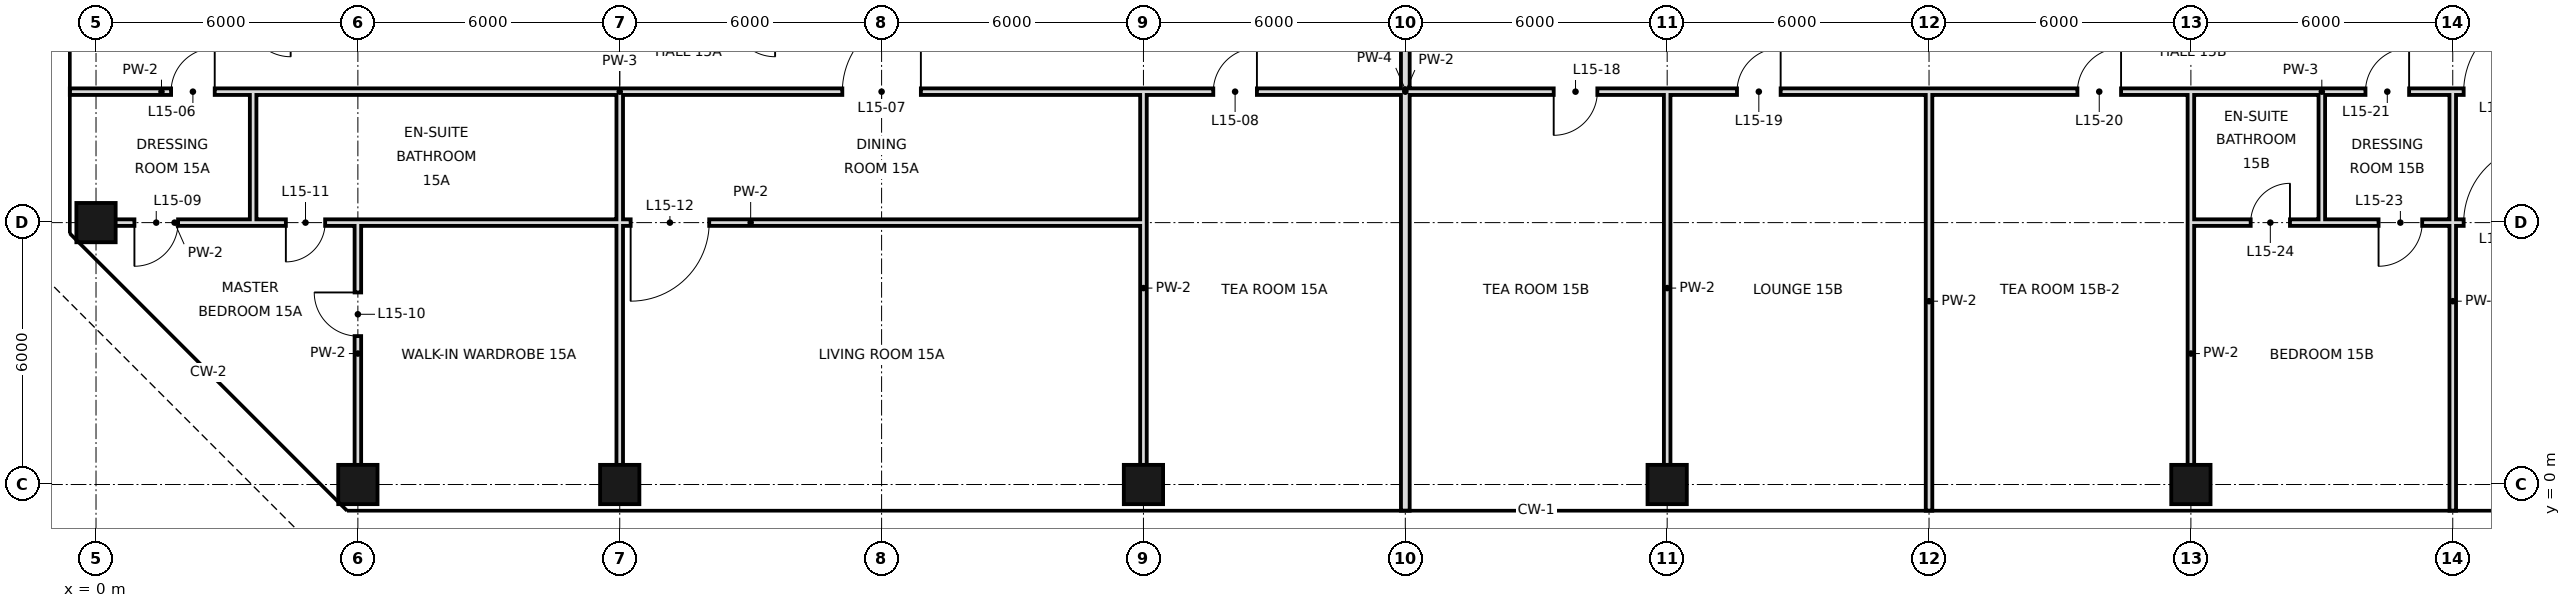
"""IFC4 building model, lengths in metres.
Left out: names, types, materials, properties, quantities, classifications, styles, units other than length and angle.
Written with IfcOpenShell. Run it as: python <this file> out.ifc"""

import sys

from ifc_helpers import new_model, si_unit, direction, frame, frame_2d, origin, origin_2d, place, context, subcontext, project, spatial, rectangle, hollow_rectangle, extrude, element, fill, save


model = new_model("IFC4")
c1 = context("Model", 3, precision=1e-05, world=origin(), true_north=direction((0.0, 1.0)))
c2 = subcontext(c1, "Body", "Model", "MODEL_VIEW")
j1 = project(units=[si_unit("LENGTHUNIT", "METRE"), si_unit("PLANEANGLEUNIT", "RADIAN")], contexts=[c1])
p1 = place(None, origin())
s1 = spatial("IfcSite", under=j1, at=p1, CompositionType="ELEMENT")
p2 = place(p1, origin())
s2 = spatial("IfcBuilding", under=s1, at=p2, CompositionType="ELEMENT")
p3 = place(p2, frame((0.0, 0.0, 75.0)))
s3 = spatial("IfcBuildingStorey", under=s2, at=p3, CompositionType="ELEMENT", Elevation=75.0)
for number, where, z_axis, x_axis in (
    (1, (0.0, 6.0, 0.0), (0.0, 0.0, 1.0), (1.0, 0.0, 0.0)),
    (2, (6.0, 0.0, 0.0), (0.0, 0.0, 1.0), (1.0, 0.0, 0.0)),
    (3, (12.0, 0.0, 0.0), (0.0, 0.0, 1.0), (1.0, 0.0, 0.0)),
    (4, (24.0, 0.0, 0.0), (0.0, 0.0, 1.0), (1.0, 0.0, 0.0)),
    (5, (36.0, 0.0, 0.0), (0.0, 0.0, 1.0), (1.0, 0.0, 0.0)),
    (6, (48.0, 0.0, 0.0), (0.0, 0.0, 1.0), (1.0, 0.0, 0.0)),
):
    element("IfcColumn", number, at=place(p3, frame(where, z_axis=z_axis, x_axis=x_axis)), inside=s3, PredefinedType="COLUMN", context=c2, shape_type="SweptSolid", body=[
        extrude(hollow_rectangle(XDim=0.9, YDim=0.9, WallThickness=0.045, at=origin_2d()), origin(), (0.0, 0.0, 1.0), 3.6),
    ])
p4 = place(p3, frame((12.0, 0.0, 0.0), z_axis=(0.0, 0.0, 1.0), x_axis=(0.0, 1.0, 0.0)))
e7 = element("IfcWall", 7, at=p4, inside=s3, PredefinedType="PARTITIONING", context=c2, shape_type="SweptSolid", body=[
    extrude(rectangle(XDim=6.0, YDim=0.15, at=frame_2d((3.0, 0.0))), origin(), (0.0, 0.0, 1.0), 2.72),
])
p5 = place(p3, frame((12.0, 6.0, 0.0), z_axis=(0.0, 0.0, 1.0), x_axis=(0.0, 1.0, 0.0)))
e8 = element("IfcWall", 8, at=p5, inside=s3, PredefinedType="PARTITIONING", context=c2, shape_type="SweptSolid", body=[
    extrude(rectangle(XDim=3.0, YDim=0.15, at=frame_2d((1.5, 0.0))), origin(), (0.0, 0.0, 1.0), 2.72),
])
p6 = place(p3, frame((24.0, 0.0, 0.0), z_axis=(0.0, 0.0, 1.0), x_axis=(0.0, 1.0, 0.0)))
e9 = element("IfcWall", 9, at=p6, inside=s3, PredefinedType="PARTITIONING", context=c2, shape_type="SweptSolid", body=[
    extrude(rectangle(XDim=9.0, YDim=0.15, at=frame_2d((4.5, 0.0))), origin(), (0.0, 0.0, 1.0), 2.72),
])
p7 = place(p3, frame((3.6, 6.0, 0.0), z_axis=(0.0, 0.0, 1.0), x_axis=(0.0, 1.0, 0.0)))
e10 = element("IfcWall", 10, at=p7, inside=s3, PredefinedType="PARTITIONING", context=c2, shape_type="SweptSolid", body=[
    extrude(rectangle(XDim=3.0, YDim=0.15, at=frame_2d((1.5, 0.0))), origin(), (0.0, 0.0, 1.0), 3.42),
])
p8 = place(p3, frame((30.0, -0.6, 0.0), z_axis=(0.0, 0.0, 1.0), x_axis=(0.0, 1.0, 0.0)))
e11 = element("IfcWall", 11, at=p8, inside=s3, PredefinedType="SOLIDWALL", context=c2, shape_type="SweptSolid", body=[
    extrude(rectangle(XDim=19.3, YDim=0.2, at=frame_2d((9.65, 0.0))), origin(), (0.0, 0.0, 1.0), 2.72),
])
p9 = place(p3, frame((36.0, 0.0, 0.0), z_axis=(0.0, 0.0, 1.0), x_axis=(0.0, 1.0, 0.0)))
e12 = element("IfcWall", 12, at=p9, inside=s3, PredefinedType="PARTITIONING", context=c2, shape_type="SweptSolid", body=[
    extrude(rectangle(XDim=9.0, YDim=0.15, at=frame_2d((4.5, 0.0))), origin(), (0.0, 0.0, 1.0), 2.72),
])
p10 = place(p3, frame((42.0, -0.6, 0.0), z_axis=(0.0, 0.0, 1.0), x_axis=(0.0, 1.0, 0.0)))
e13 = element("IfcWall", 13, at=p10, inside=s3, PredefinedType="PARTITIONING", context=c2, shape_type="SweptSolid", body=[
    extrude(rectangle(XDim=9.6, YDim=0.15, at=frame_2d((4.8, 0.0))), origin(), (0.0, 0.0, 1.0), 2.72),
])
p11 = place(p3, frame((48.0, 0.0, 0.0), z_axis=(0.0, 0.0, 1.0), x_axis=(0.0, 1.0, 0.0)))
e14 = element("IfcWall", 14, at=p11, inside=s3, PredefinedType="PARTITIONING", context=c2, shape_type="SweptSolid", body=[
    extrude(rectangle(XDim=6.0, YDim=0.15, at=frame_2d((3.0, 0.0))), origin(), (0.0, 0.0, 1.0), 2.72),
])
p12 = place(p3, frame((48.0, 6.0, 0.0), z_axis=(0.0, 0.0, 1.0), x_axis=(0.0, 1.0, 0.0)))
e15 = element("IfcWall", 15, at=p12, inside=s3, PredefinedType="PARTITIONING", context=c2, shape_type="SweptSolid", body=[
    extrude(rectangle(XDim=3.0, YDim=0.15, at=frame_2d((1.5, 0.0))), origin(), (0.0, 0.0, 1.0), 2.72),
])
p13 = place(p3, frame((51.0, 6.0, 0.0), z_axis=(0.0, 0.0, 1.0), x_axis=(0.0, 1.0, 0.0)))
e16 = element("IfcWall", 16, at=p13, inside=s3, PredefinedType="PARTITIONING", context=c2, shape_type="SweptSolid", body=[
    extrude(rectangle(XDim=3.0, YDim=0.15, at=frame_2d((1.5, 0.0))), origin(), (0.0, 0.0, 1.0), 3.42),
])
p14 = place(p3, frame((54.0, -0.6, 0.0), z_axis=(0.0, 0.0, 1.0), x_axis=(0.0, 1.0, 0.0)))
e17 = element("IfcWall", 17, at=p14, inside=s3, PredefinedType="PARTITIONING", context=c2, shape_type="SweptSolid", body=[
    extrude(rectangle(XDim=9.6, YDim=0.15, at=frame_2d((4.8, 0.0))), origin(), (0.0, 0.0, 1.0), 3.42),
])
p15 = place(p3, frame((6.0, 0.0, 0.0), z_axis=(0.0, 0.0, 1.0), x_axis=(0.0, 1.0, 0.0)))
e18 = element("IfcWall", 18, at=p15, inside=s3, PredefinedType="PARTITIONING", context=c2, shape_type="SweptSolid", body=[
    extrude(rectangle(XDim=6.0, YDim=0.15, at=frame_2d((3.0, 0.0))), origin(), (0.0, 0.0, 1.0), 2.72),
])
p16 = place(p15, frame((3.4, 0.0, 0.0)))
e19 = element("IfcOpeningElement", 19, at=p16, cuts=e18, PredefinedType="OPENING", context=c2, shape_type="SweptSolid", body=[
    extrude(rectangle(XDim=1.0, YDim=2.4, at=frame_2d((0.5, 1.2))), frame((0.0, 0.085, 0.0), z_axis=(0.0, -1.0, 0.0), x_axis=(1.0, 0.0, 0.0)), (0.0, 0.0, 1.0), 0.17),
])
p17 = place(p3, frame((0.0, 6.0, 0.0), z_axis=(0.0, 0.0, 1.0), x_axis=(1.0, 0.0, 0.0)))
e20 = element("IfcWall", 20, at=p17, inside=s3, PredefinedType="PARTITIONING", context=c2, shape_type="SweptSolid", body=[
    extrude(rectangle(XDim=3.6, YDim=0.15, at=frame_2d((1.8, 0.0))), origin(), (0.0, 0.0, 1.0), 2.97),
])
p18 = place(p17, frame((0.88, 0.0, 0.0)))
e21 = element("IfcOpeningElement", 21, at=p18, cuts=e20, PredefinedType="OPENING", context=c2, shape_type="SweptSolid", body=[
    extrude(rectangle(XDim=1.0, YDim=2.4, at=frame_2d((0.5, 1.2))), frame((0.0, 0.085, 0.0), z_axis=(0.0, -1.0, 0.0), x_axis=(1.0, 0.0, 0.0)), (0.0, 0.0, 1.0), 0.17),
])
p19 = place(p3, frame((12.0, 6.0, 0.0), z_axis=(0.0, 0.0, 1.0), x_axis=(1.0, 0.0, 0.0)))
e22 = element("IfcWall", 22, at=p19, inside=s3, PredefinedType="PARTITIONING", context=c2, shape_type="SweptSolid", body=[
    extrude(rectangle(XDim=12.0, YDim=0.15, at=frame_2d((6.0, 0.0))), origin(), (0.0, 0.0, 1.0), 2.97),
])
p20 = place(p19, frame((0.25, 0.0, 0.0)))
e23 = element("IfcOpeningElement", 23, at=p20, cuts=e22, PredefinedType="OPENING", context=c2, shape_type="SweptSolid", body=[
    extrude(rectangle(XDim=1.8, YDim=2.4, at=frame_2d((0.9, 1.2))), frame((0.0, 0.085, 0.0), z_axis=(0.0, -1.0, 0.0), x_axis=(1.0, 0.0, 0.0)), (0.0, 0.0, 1.0), 0.17),
])
p21 = place(p3, frame((51.0, 6.0, 0.0), z_axis=(0.0, 0.0, 1.0), x_axis=(1.0, 0.0, 0.0)))
e24 = element("IfcWall", 24, at=p21, inside=s3, PredefinedType="PARTITIONING", context=c2, shape_type="SweptSolid", body=[
    extrude(rectangle(XDim=15.0, YDim=0.15, at=frame_2d((7.5, 0.0))), origin(), (0.0, 0.0, 1.0), 2.52),
])
p22 = place(p21, frame((1.3, 0.0, 0.0)))
e25 = element("IfcOpeningElement", 25, at=p22, cuts=e24, PredefinedType="OPENING", context=c2, shape_type="SweptSolid", body=[
    extrude(rectangle(XDim=1.0, YDim=2.4, at=frame_2d((0.5, 1.2))), frame((0.0, 0.085, 0.0), z_axis=(0.0, -1.0, 0.0), x_axis=(1.0, 0.0, 0.0)), (0.0, 0.0, 1.0), 0.17),
])
p23 = place(p21, frame((3.25, 0.0, 0.0)))
e26 = element("IfcOpeningElement", 26, at=p23, cuts=e24, PredefinedType="OPENING", context=c2, shape_type="SweptSolid", body=[
    extrude(rectangle(XDim=1.8, YDim=2.4, at=frame_2d((0.9, 1.2))), frame((0.0, 0.085, 0.0), z_axis=(0.0, -1.0, 0.0), x_axis=(1.0, 0.0, 0.0)), (0.0, 0.0, 1.0), 0.17),
])
p24 = place(p3, frame((3.6, 6.0, 0.0), z_axis=(0.0, 0.0, 1.0), x_axis=(1.0, 0.0, 0.0)))
e27 = element("IfcWall", 27, at=p24, inside=s3, PredefinedType="PARTITIONING", context=c2, shape_type="SweptSolid", body=[
    extrude(rectangle(XDim=8.4, YDim=0.15, at=frame_2d((4.2, 0.0))), origin(), (0.0, 0.0, 1.0), 2.97),
])
p25 = place(p24, frame((0.75, 0.0, 0.0)))
e28 = element("IfcOpeningElement", 28, at=p25, cuts=e27, PredefinedType="OPENING", context=c2, shape_type="SweptSolid", body=[
    extrude(rectangle(XDim=0.9, YDim=2.4, at=frame_2d((0.45, 1.2))), frame((0.0, 0.085, 0.0), z_axis=(0.0, -1.0, 0.0), x_axis=(1.0, 0.0, 0.0)), (0.0, 0.0, 1.0), 0.17),
])
p26 = place(p3, frame((48.0, 6.0, 0.0), z_axis=(0.0, 0.0, 1.0), x_axis=(1.0, 0.0, 0.0)))
e29 = element("IfcWall", 29, at=p26, inside=s3, PredefinedType="PARTITIONING", context=c2, shape_type="SweptSolid", body=[
    extrude(rectangle(XDim=3.0, YDim=0.15, at=frame_2d((1.5, 0.0))), origin(), (0.0, 0.0, 1.0), 2.52),
])
p27 = place(p26, frame((1.37, 0.0, 0.0)))
e30 = element("IfcOpeningElement", 30, at=p27, cuts=e29, PredefinedType="OPENING", context=c2, shape_type="SweptSolid", body=[
    extrude(rectangle(XDim=0.9, YDim=2.4, at=frame_2d((0.45, 1.2))), frame((0.0, 0.085, 0.0), z_axis=(0.0, -1.0, 0.0), x_axis=(1.0, 0.0, 0.0)), (0.0, 0.0, 1.0), 0.17),
])
p28 = place(p3, frame((-0.6, 9.0, 0.0), z_axis=(0.0, 0.0, 1.0), x_axis=(1.0, 0.0, 0.0)))
e31 = element("IfcWall", 31, at=p28, inside=s3, PredefinedType="PARTITIONING", context=c2, shape_type="SweptSolid", body=[
    extrude(rectangle(XDim=4.2, YDim=0.15, at=frame_2d((2.1, 0.0))), origin(), (0.0, 0.0, 1.0), 3.42),
])
p29 = place(p28, frame((2.32, 0.0, 0.0)))
e32 = element("IfcOpeningElement", 32, at=p29, cuts=e31, PredefinedType="OPENING", context=c2, shape_type="SweptSolid", body=[
    extrude(rectangle(XDim=1.0, YDim=2.4, at=frame_2d((0.5, 1.2))), frame((0.0, 0.085, 0.0), z_axis=(0.0, -1.0, 0.0), x_axis=(1.0, 0.0, 0.0)), (0.0, 0.0, 1.0), 0.17),
])
p30 = place(p3, frame((12.0, 9.0, 0.0), z_axis=(0.0, 0.0, 1.0), x_axis=(1.0, 0.0, 0.0)))
e33 = element("IfcWall", 33, at=p30, inside=s3, PredefinedType="PARTITIONING", context=c2, shape_type="SweptSolid", body=[
    extrude(rectangle(XDim=36.0, YDim=0.15, at=frame_2d((18.0, 0.0))), origin(), (0.0, 0.0, 1.0), 3.42),
])
p31 = place(p30, frame((5.1, 0.0, 0.0)))
e34 = element("IfcOpeningElement", 34, at=p31, cuts=e33, PredefinedType="OPENING", context=c2, shape_type="SweptSolid", body=[
    extrude(rectangle(XDim=1.8, YDim=2.4, at=frame_2d((0.9, 1.2))), frame((0.0, 0.085, 0.0), z_axis=(0.0, -1.0, 0.0), x_axis=(1.0, 0.0, 0.0)), (0.0, 0.0, 1.0), 0.17),
])
p32 = place(p30, frame((13.6, 0.0, 0.0)))
e35 = element("IfcOpeningElement", 35, at=p32, cuts=e33, PredefinedType="OPENING", context=c2, shape_type="SweptSolid", body=[
    extrude(rectangle(XDim=1.0, YDim=2.4, at=frame_2d((0.5, 1.2))), frame((0.0, 0.085, 0.0), z_axis=(0.0, -1.0, 0.0), x_axis=(1.0, 0.0, 0.0)), (0.0, 0.0, 1.0), 0.17),
])
p33 = place(p30, frame((21.4, 0.0, 0.0)))
e36 = element("IfcOpeningElement", 36, at=p33, cuts=e33, PredefinedType="OPENING", context=c2, shape_type="SweptSolid", body=[
    extrude(rectangle(XDim=1.0, YDim=2.4, at=frame_2d((0.5, 1.2))), frame((0.0, 0.085, 0.0), z_axis=(0.0, -1.0, 0.0), x_axis=(1.0, 0.0, 0.0)), (0.0, 0.0, 1.0), 0.17),
])
p34 = place(p30, frame((25.6, 0.0, 0.0)))
e37 = element("IfcOpeningElement", 37, at=p34, cuts=e33, PredefinedType="OPENING", context=c2, shape_type="SweptSolid", body=[
    extrude(rectangle(XDim=1.0, YDim=2.4, at=frame_2d((0.5, 1.2))), frame((0.0, 0.085, 0.0), z_axis=(0.0, -1.0, 0.0), x_axis=(1.0, 0.0, 0.0)), (0.0, 0.0, 1.0), 0.17),
])
p35 = place(p30, frame((33.4, 0.0, 0.0)))
e38 = element("IfcOpeningElement", 38, at=p35, cuts=e33, PredefinedType="OPENING", context=c2, shape_type="SweptSolid", body=[
    extrude(rectangle(XDim=1.0, YDim=2.4, at=frame_2d((0.5, 1.2))), frame((0.0, 0.085, 0.0), z_axis=(0.0, -1.0, 0.0), x_axis=(1.0, 0.0, 0.0)), (0.0, 0.0, 1.0), 0.17),
])
p36 = place(p3, frame((51.0, 9.0, 0.0), z_axis=(0.0, 0.0, 1.0), x_axis=(1.0, 0.0, 0.0)))
e39 = element("IfcWall", 39, at=p36, inside=s3, PredefinedType="PARTITIONING", context=c2, shape_type="SweptSolid", body=[
    extrude(rectangle(XDim=15.6, YDim=0.15, at=frame_2d((7.8, 0.0))), origin(), (0.0, 0.0, 1.0), 3.42),
])
p37 = place(p36, frame((1.0, 0.0, 0.0)))
e40 = element("IfcOpeningElement", 40, at=p37, cuts=e39, PredefinedType="OPENING", context=c2, shape_type="SweptSolid", body=[
    extrude(rectangle(XDim=1.0, YDim=2.4, at=frame_2d((0.5, 1.2))), frame((0.0, 0.085, 0.0), z_axis=(0.0, -1.0, 0.0), x_axis=(1.0, 0.0, 0.0)), (0.0, 0.0, 1.0), 0.17),
])
p38 = place(p36, frame((3.25, 0.0, 0.0)))
e41 = element("IfcOpeningElement", 41, at=p38, cuts=e39, PredefinedType="OPENING", context=c2, shape_type="SweptSolid", body=[
    extrude(rectangle(XDim=1.8, YDim=2.4, at=frame_2d((0.9, 1.2))), frame((0.0, 0.085, 0.0), z_axis=(0.0, -1.0, 0.0), x_axis=(1.0, 0.0, 0.0)), (0.0, 0.0, 1.0), 0.17),
])
p39 = place(p3, frame((3.6, 9.0, 0.0), z_axis=(0.0, 0.0, 1.0), x_axis=(1.0, 0.0, 0.0)))
e42 = element("IfcWall", 42, at=p39, inside=s3, PredefinedType="PARTITIONING", context=c2, shape_type="SweptSolid", body=[
    extrude(rectangle(XDim=8.4, YDim=0.15, at=frame_2d((4.2, 0.0))), origin(), (0.0, 0.0, 1.0), 3.42),
])
p40 = place(p3, frame((48.0, 9.0, 0.0), z_axis=(0.0, 0.0, 1.0), x_axis=(1.0, 0.0, 0.0)))
e43 = element("IfcWall", 43, at=p40, inside=s3, PredefinedType="PARTITIONING", context=c2, shape_type="SweptSolid", body=[
    extrude(rectangle(XDim=3.0, YDim=0.15, at=frame_2d((1.5, 0.0))), origin(), (0.0, 0.0, 1.0), 3.42),
])
p41 = place(p29, frame((1.0, 0.0, 0.0), z_axis=(0.0, 0.0, 1.0), x_axis=(-1.0, 0.0, 0.0)))
e44 = element("IfcDoor", 44, at=p41, inside=s3, OperationType="SINGLE_SWING_LEFT", PredefinedType="DOOR", context=c2, shape_type="SweptSolid", body=[
    extrude(rectangle(XDim=1.0, YDim=2.4, at=frame_2d((0.5, 1.2))), frame((0.0, 0.025, 0.0), z_axis=(0.0, -1.0, 0.0), x_axis=(1.0, 0.0, 0.0)), (0.0, 0.0, 1.0), 0.05),
])
fill(e32, e44)
p42 = place(p31, frame((1.8, 0.0, 0.0), z_axis=(0.0, 0.0, 1.0), x_axis=(-1.0, 0.0, 0.0)))
e45 = element("IfcDoor", 45, at=p42, inside=s3, OperationType="SINGLE_SWING_LEFT", PredefinedType="DOOR", context=c2, shape_type="SweptSolid", body=[
    extrude(rectangle(XDim=1.8, YDim=2.4, at=frame_2d((0.9, 1.2))), frame((0.0, 0.025, 0.0), z_axis=(0.0, -1.0, 0.0), x_axis=(1.0, 0.0, 0.0)), (0.0, 0.0, 1.0), 0.05),
])
fill(e34, e45)
p43 = place(p32, frame((1.0, 0.0, 0.0), z_axis=(0.0, 0.0, 1.0), x_axis=(-1.0, 0.0, 0.0)))
e46 = element("IfcDoor", 46, at=p43, inside=s3, OperationType="SINGLE_SWING_LEFT", PredefinedType="DOOR", context=c2, shape_type="SweptSolid", body=[
    extrude(rectangle(XDim=1.0, YDim=2.4, at=frame_2d((0.5, 1.2))), frame((0.0, 0.025, 0.0), z_axis=(0.0, -1.0, 0.0), x_axis=(1.0, 0.0, 0.0)), (0.0, 0.0, 1.0), 0.05),
])
fill(e35, e46)
p44 = place(p18, frame((1.0, 0.0, 0.0), z_axis=(0.0, 0.0, 1.0), x_axis=(-1.0, 0.0, 0.0)))
e47 = element("IfcDoor", 47, at=p44, inside=s3, OperationType="SINGLE_SWING_RIGHT", PredefinedType="DOOR", context=c2, shape_type="SweptSolid", body=[
    extrude(rectangle(XDim=1.0, YDim=2.4, at=frame_2d((0.5, 1.2))), frame((0.0, 0.025, 0.0), z_axis=(0.0, -1.0, 0.0), x_axis=(1.0, 0.0, 0.0)), (0.0, 0.0, 1.0), 0.05),
])
fill(e21, e47)
p45 = place(p16, frame((1.0, 0.0, 0.0), z_axis=(0.0, 0.0, 1.0), x_axis=(-1.0, 0.0, 0.0)))
e48 = element("IfcDoor", 48, at=p45, inside=s3, OperationType="SINGLE_SWING_LEFT", PredefinedType="DOOR", context=c2, shape_type="SweptSolid", body=[
    extrude(rectangle(XDim=1.0, YDim=2.4, at=frame_2d((0.5, 1.2))), frame((0.0, 0.025, 0.0), z_axis=(0.0, -1.0, 0.0), x_axis=(1.0, 0.0, 0.0)), (0.0, 0.0, 1.0), 0.05),
])
fill(e19, e48)
p46 = place(p25, frame((0.9, 0.0, 0.0), z_axis=(0.0, 0.0, 1.0), x_axis=(-1.0, 0.0, 0.0)))
e49 = element("IfcDoor", 49, at=p46, inside=s3, OperationType="SINGLE_SWING_RIGHT", PredefinedType="DOOR", context=c2, shape_type="SweptSolid", body=[
    extrude(rectangle(XDim=0.9, YDim=2.4, at=frame_2d((0.45, 1.2))), frame((0.0, 0.025, 0.0), z_axis=(0.0, -1.0, 0.0), x_axis=(1.0, 0.0, 0.0)), (0.0, 0.0, 1.0), 0.05),
])
fill(e28, e49)
p47 = place(p20, frame((1.8, 0.0, 0.0), z_axis=(0.0, 0.0, 1.0), x_axis=(-1.0, 0.0, 0.0)))
e50 = element("IfcDoor", 50, at=p47, inside=s3, OperationType="SINGLE_SWING_RIGHT", PredefinedType="DOOR", context=c2, shape_type="SweptSolid", body=[
    extrude(rectangle(XDim=1.8, YDim=2.4, at=frame_2d((0.9, 1.2))), frame((0.0, 0.025, 0.0), z_axis=(0.0, -1.0, 0.0), x_axis=(1.0, 0.0, 0.0)), (0.0, 0.0, 1.0), 0.05),
])
fill(e23, e50)
p48 = place(p33, frame((1.0, 0.0, 0.0), z_axis=(0.0, 0.0, 1.0), x_axis=(-1.0, 0.0, 0.0)))
e51 = element("IfcDoor", 51, at=p48, inside=s3, OperationType="SINGLE_SWING_RIGHT", PredefinedType="DOOR", context=c2, shape_type="SweptSolid", body=[
    extrude(rectangle(XDim=1.0, YDim=2.4, at=frame_2d((0.5, 1.2))), frame((0.0, 0.025, 0.0), z_axis=(0.0, -1.0, 0.0), x_axis=(1.0, 0.0, 0.0)), (0.0, 0.0, 1.0), 0.05),
])
fill(e36, e51)
p49 = place(p34, frame((1.0, 0.0, 0.0), z_axis=(0.0, 0.0, 1.0), x_axis=(-1.0, 0.0, 0.0)))
e52 = element("IfcDoor", 52, at=p49, inside=s3, OperationType="SINGLE_SWING_LEFT", PredefinedType="DOOR", context=c2, shape_type="SweptSolid", body=[
    extrude(rectangle(XDim=1.0, YDim=2.4, at=frame_2d((0.5, 1.2))), frame((0.0, 0.025, 0.0), z_axis=(0.0, -1.0, 0.0), x_axis=(1.0, 0.0, 0.0)), (0.0, 0.0, 1.0), 0.05),
])
fill(e37, e52)
p50 = place(p35, frame((1.0, 0.0, 0.0), z_axis=(0.0, 0.0, 1.0), x_axis=(-1.0, 0.0, 0.0)))
e53 = element("IfcDoor", 53, at=p50, inside=s3, OperationType="SINGLE_SWING_LEFT", PredefinedType="DOOR", context=c2, shape_type="SweptSolid", body=[
    extrude(rectangle(XDim=1.0, YDim=2.4, at=frame_2d((0.5, 1.2))), frame((0.0, 0.025, 0.0), z_axis=(0.0, -1.0, 0.0), x_axis=(1.0, 0.0, 0.0)), (0.0, 0.0, 1.0), 0.05),
])
fill(e38, e53)
p51 = place(p37, frame((1.0, 0.0, 0.0), z_axis=(0.0, 0.0, 1.0), x_axis=(-1.0, 0.0, 0.0)))
e54 = element("IfcDoor", 54, at=p51, inside=s3, OperationType="SINGLE_SWING_LEFT", PredefinedType="DOOR", context=c2, shape_type="SweptSolid", body=[
    extrude(rectangle(XDim=1.0, YDim=2.4, at=frame_2d((0.5, 1.2))), frame((0.0, 0.025, 0.0), z_axis=(0.0, -1.0, 0.0), x_axis=(1.0, 0.0, 0.0)), (0.0, 0.0, 1.0), 0.05),
])
fill(e40, e54)
p52 = place(p38, frame((1.8, 0.0, 0.0), z_axis=(0.0, 0.0, 1.0), x_axis=(-1.0, 0.0, 0.0)))
e55 = element("IfcDoor", 55, at=p52, inside=s3, OperationType="SINGLE_SWING_LEFT", PredefinedType="DOOR", context=c2, shape_type="SweptSolid", body=[
    extrude(rectangle(XDim=1.8, YDim=2.4, at=frame_2d((0.9, 1.2))), frame((0.0, 0.025, 0.0), z_axis=(0.0, -1.0, 0.0), x_axis=(1.0, 0.0, 0.0)), (0.0, 0.0, 1.0), 0.05),
])
fill(e41, e55)
p53 = place(p22, frame((1.0, 0.0, 0.0), z_axis=(0.0, 0.0, 1.0), x_axis=(-1.0, 0.0, 0.0)))
e56 = element("IfcDoor", 56, at=p53, inside=s3, OperationType="SINGLE_SWING_RIGHT", PredefinedType="DOOR", context=c2, shape_type="SweptSolid", body=[
    extrude(rectangle(XDim=1.0, YDim=2.4, at=frame_2d((0.5, 1.2))), frame((0.0, 0.025, 0.0), z_axis=(0.0, -1.0, 0.0), x_axis=(1.0, 0.0, 0.0)), (0.0, 0.0, 1.0), 0.05),
])
fill(e25, e56)
p54 = place(p27, frame((0.9, 0.0, 0.0), z_axis=(0.0, 0.0, 1.0), x_axis=(-1.0, 0.0, 0.0)))
e57 = element("IfcDoor", 57, at=p54, inside=s3, OperationType="SINGLE_SWING_LEFT", PredefinedType="DOOR", context=c2, shape_type="SweptSolid", body=[
    extrude(rectangle(XDim=0.9, YDim=2.4, at=frame_2d((0.45, 1.2))), frame((0.0, 0.025, 0.0), z_axis=(0.0, -1.0, 0.0), x_axis=(1.0, 0.0, 0.0)), (0.0, 0.0, 1.0), 0.05),
])
fill(e30, e57)
p55 = place(p23, frame((1.8, 0.0, 0.0), z_axis=(0.0, 0.0, 1.0), x_axis=(-1.0, 0.0, 0.0)))
e58 = element("IfcDoor", 58, at=p55, inside=s3, OperationType="SINGLE_SWING_LEFT", PredefinedType="DOOR", context=c2, shape_type="SweptSolid", body=[
    extrude(rectangle(XDim=1.8, YDim=2.4, at=frame_2d((0.9, 1.2))), frame((0.0, 0.025, 0.0), z_axis=(0.0, -1.0, 0.0), x_axis=(1.0, 0.0, 0.0)), (0.0, 0.0, 1.0), 0.05),
])
fill(e26, e58)
save(model, sys.argv[1])
